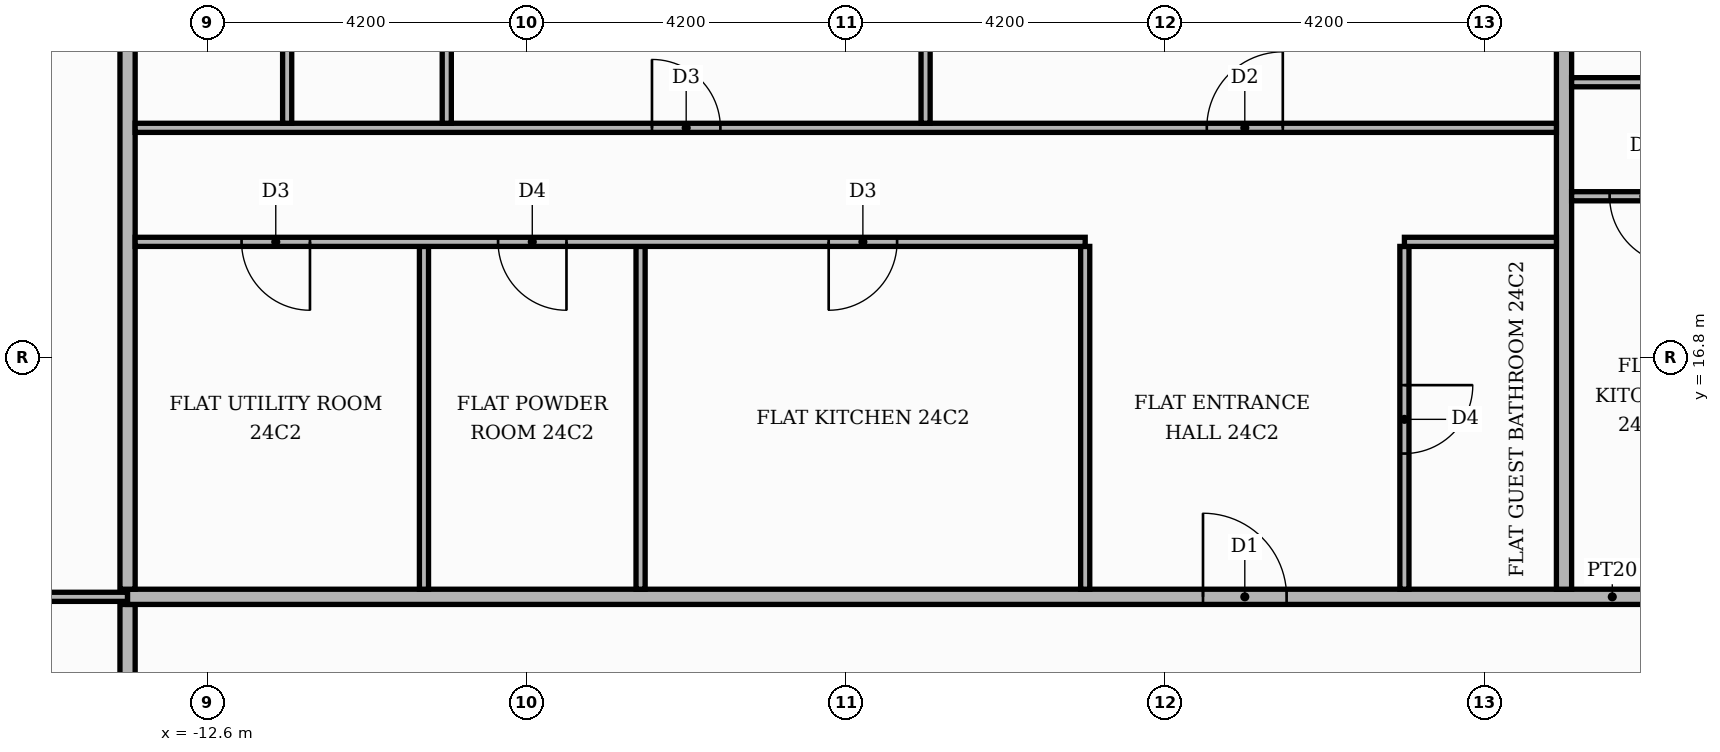
"""IFC4 building model, lengths in metres.
Left out: names, types, materials, properties, quantities, classifications, styles, units other than length and angle.
Written with IfcOpenShell. Run it as: python <this file> out.ifc"""

import sys

from ifc_helpers import new_model, si_unit, direction, frame, frame_2d, origin, place, context, subcontext, project, spatial, rectangle, extrude, element, fill, save


model = new_model("IFC4")
c1 = context("Model", 3, precision=1e-05, world=origin(), true_north=direction((0.0, 1.0)))
c2 = subcontext(c1, "Body", "Model", "MODEL_VIEW")
j1 = project(units=[si_unit("LENGTHUNIT", "METRE"), si_unit("PLANEANGLEUNIT", "RADIAN")], contexts=[c1])
p1 = place(None, origin())
s1 = spatial("IfcSite", under=j1, at=p1, CompositionType="ELEMENT")
p2 = place(p1, origin())
s2 = spatial("IfcBuilding", under=s1, at=p2, CompositionType="ELEMENT")
p3 = place(p2, frame((0.0, 0.0, 102.6)))
s3 = spatial("IfcBuildingStorey", under=s2, at=p3, CompositionType="ELEMENT", Elevation=102.6)
p4 = place(p3, frame((-13.65, -13.55, 0.0), z_axis=(0.0, 0.0, 1.0), x_axis=(0.0, 1.0, 0.0)))
e1 = element("IfcWall", 1, at=p4, inside=s3, PredefinedType="PARTITIONING", context=c2, shape_type="SweptSolid", body=[
    extrude(rectangle(XDim=27.1, YDim=0.2, at=frame_2d((13.55, 0.0))), origin(), (0.0, 0.0, 1.0), 3.48),
])
p5 = place(p4, frame((23.5, 0.0, 0.0)))
e2 = element("IfcOpeningElement", 2, at=p5, cuts=e1, PredefinedType="OPENING", context=c2, shape_type="SweptSolid", body=[
    extrude(rectangle(XDim=1.1, YDim=2.4, at=frame_2d((0.55, 1.2))), frame((0.0, 0.11, 0.0), z_axis=(0.0, -1.0, 0.0), x_axis=(1.0, 0.0, 0.0)), (0.0, 0.0, 1.0), 0.22),
])
p6 = place(p3, frame((-19.82, 13.65, 0.0), z_axis=(0.0, 0.0, 1.0), x_axis=(1.0, 0.0, 0.0)))
e3 = element("IfcWall", 3, at=p6, inside=s3, PredefinedType="PARTITIONING", context=c2, shape_type="SweptSolid", body=[
    extrude(rectangle(XDim=6.17, YDim=0.12, at=frame_2d((3.085, 0.0))), origin(), (0.0, 0.0, 1.0), 3.48),
])
p7 = place(p6, frame((2.635, 0.0, 0.0)))
e4 = element("IfcOpeningElement", 4, at=p7, cuts=e3, PredefinedType="OPENING", context=c2, shape_type="SweptSolid", body=[
    extrude(rectangle(XDim=0.9, YDim=2.1, at=frame_2d((0.45, 1.05))), frame((0.0, 0.07, 0.0), z_axis=(0.0, -1.0, 0.0), x_axis=(1.0, 0.0, 0.0)), (0.0, 0.0, 1.0), 0.14),
])
p8 = place(p3, frame((-13.65, 13.65, 0.0), z_axis=(0.0, 0.0, 1.0), x_axis=(1.0, 0.0, 0.0)))
e5 = element("IfcWall", 5, at=p8, inside=s3, PredefinedType="PARTITIONING", context=c2, shape_type="SweptSolid", body=[
    extrude(rectangle(XDim=39.07, YDim=0.2, at=frame_2d((19.535, 0.0))), origin(), (0.0, 0.0, 1.0), 3.48),
])
p9 = place(p8, frame((24.65, 0.0, 0.0)))
e6 = element("IfcOpeningElement", 6, at=p9, cuts=e5, PredefinedType="OPENING", context=c2, shape_type="SweptSolid", body=[
    extrude(rectangle(XDim=1.1, YDim=2.4, at=frame_2d((0.55, 1.2))), frame((0.0, 0.11, 0.0), z_axis=(0.0, -1.0, 0.0), x_axis=(1.0, 0.0, 0.0)), (0.0, 0.0, 1.0), 0.22),
])
p10 = place(p8, frame((14.15, 0.0, 0.0)))
e7 = element("IfcOpeningElement", 7, at=p10, cuts=e5, PredefinedType="OPENING", context=c2, shape_type="SweptSolid", body=[
    extrude(rectangle(XDim=1.1, YDim=2.4, at=frame_2d((0.55, 1.2))), frame((0.0, 0.11, 0.0), z_axis=(0.0, -1.0, 0.0), x_axis=(1.0, 0.0, 0.0)), (0.0, 0.0, 1.0), 0.22),
])
p11 = place(p3, frame((-13.65, 13.75, 0.0), z_axis=(0.0, 0.0, 1.0), x_axis=(0.0, 1.0, 0.0)))
e8 = element("IfcWall", 8, at=p11, inside=s3, PredefinedType="PARTITIONING", context=c2, shape_type="SweptSolid", body=[
    extrude(rectangle(XDim=11.67, YDim=0.2, at=frame_2d((5.835, 0.0))), origin(), (0.0, 0.0, 1.0), 3.48),
])
for number, where, z_axis, x_axis in (
    (9, (-9.75, 13.75, 0.0), (0.0, 0.0, 1.0), (0.0, 1.0, 0.0)),
    (10, (-6.9, 13.75, 0.0), (0.0, 0.0, 1.0), (0.0, 1.0, 0.0)),
    (11, (-1.05, 13.75, 0.0), (0.0, 0.0, 1.0), (0.0, 1.0, 0.0)),
):
    element("IfcWall", number, at=place(p3, frame(where, z_axis=z_axis, x_axis=x_axis)), inside=s3, PredefinedType="PARTITIONING", context=c2, shape_type="SweptSolid", body=[
        extrude(rectangle(XDim=4.51, YDim=0.12, at=frame_2d((2.255, 0.0))), origin(), (0.0, 0.0, 1.0), 3.48),
    ])
p12 = place(p3, frame((3.15, 13.75, 0.0), z_axis=(0.0, 0.0, 1.0), x_axis=(0.0, 1.0, 0.0)))
e12 = element("IfcWall", 12, at=p12, inside=s3, PredefinedType="PARTITIONING", context=c2, shape_type="SweptSolid", body=[
    extrude(rectangle(XDim=4.51, YDim=0.12, at=frame_2d((2.255, 0.0))), origin(), (0.0, 0.0, 1.0), 3.48),
])
p13 = place(p12, frame((1.785, 0.0, 0.0)))
e13 = element("IfcOpeningElement", 13, at=p13, cuts=e12, PredefinedType="OPENING", context=c2, shape_type="SweptSolid", body=[
    extrude(rectangle(XDim=0.9, YDim=2.1, at=frame_2d((0.45, 1.05))), frame((0.0, 0.07, 0.0), z_axis=(0.0, -1.0, 0.0), x_axis=(1.0, 0.0, 0.0)), (0.0, 0.0, 1.0), 0.14),
])
p14 = place(p3, frame((5.25, 13.75, 0.0), z_axis=(0.0, 0.0, 1.0), x_axis=(0.0, 1.0, 0.0)))
e14 = element("IfcWall", 14, at=p14, inside=s3, PredefinedType="PARTITIONING", context=c2, shape_type="SweptSolid", body=[
    extrude(rectangle(XDim=11.67, YDim=0.2, at=frame_2d((5.835, 0.0))), origin(), (0.0, 0.0, 1.0), 3.48),
])
p15 = place(p3, frame((-13.55, 18.32, 0.0), z_axis=(0.0, 0.0, 1.0), x_axis=(1.0, 0.0, 0.0)))
e15 = element("IfcWall", 15, at=p15, inside=s3, PredefinedType="PARTITIONING", context=c2, shape_type="SweptSolid", body=[
    extrude(rectangle(XDim=12.5, YDim=0.12, at=frame_2d((6.25, 0.0))), origin(), (0.0, 0.0, 1.0), 3.48),
])
p16 = place(p15, frame((9.125, 0.0, 0.0)))
e16 = element("IfcOpeningElement", 16, at=p16, cuts=e15, PredefinedType="OPENING", context=c2, shape_type="SweptSolid", body=[
    extrude(rectangle(XDim=0.9, YDim=2.1, at=frame_2d((0.45, 1.05))), frame((0.0, 0.07, 0.0), z_axis=(0.0, -1.0, 0.0), x_axis=(1.0, 0.0, 0.0)), (0.0, 0.0, 1.0), 0.14),
])
p17 = place(p15, frame((4.775, 0.0, 0.0)))
e17 = element("IfcOpeningElement", 17, at=p17, cuts=e15, PredefinedType="OPENING", context=c2, shape_type="SweptSolid", body=[
    extrude(rectangle(XDim=0.9, YDim=2.1, at=frame_2d((0.45, 1.05))), frame((0.0, 0.07, 0.0), z_axis=(0.0, -1.0, 0.0), x_axis=(1.0, 0.0, 0.0)), (0.0, 0.0, 1.0), 0.14),
])
p18 = place(p15, frame((1.4, 0.0, 0.0)))
e18 = element("IfcOpeningElement", 18, at=p18, cuts=e15, PredefinedType="OPENING", context=c2, shape_type="SweptSolid", body=[
    extrude(rectangle(XDim=0.9, YDim=2.1, at=frame_2d((0.45, 1.05))), frame((0.0, 0.07, 0.0), z_axis=(0.0, -1.0, 0.0), x_axis=(1.0, 0.0, 0.0)), (0.0, 0.0, 1.0), 0.14),
])
p19 = place(p3, frame((3.15, 18.32, 0.0), z_axis=(0.0, 0.0, 1.0), x_axis=(1.0, 0.0, 0.0)))
e19 = element("IfcWall", 19, at=p19, inside=s3, PredefinedType="PARTITIONING", context=c2, shape_type="SweptSolid", body=[
    extrude(rectangle(XDim=2.0, YDim=0.12, at=frame_2d((1.0, 0.0))), origin(), (0.0, 0.0, 1.0), 3.48),
])
p20 = place(p3, frame((5.35, 18.92, 0.0), z_axis=(0.0, 0.0, 1.0), x_axis=(1.0, 0.0, 0.0)))
e20 = element("IfcWall", 20, at=p20, inside=s3, PredefinedType="PARTITIONING", context=c2, shape_type="SweptSolid", body=[
    extrude(rectangle(XDim=4.1, YDim=0.12, at=frame_2d((2.05, 0.0))), origin(), (0.0, 0.0, 1.0), 3.48),
])
p21 = place(p20, frame((0.5, 0.0, 0.0)))
e21 = element("IfcOpeningElement", 21, at=p21, cuts=e20, PredefinedType="OPENING", context=c2, shape_type="SweptSolid", body=[
    extrude(rectangle(XDim=0.9, YDim=2.1, at=frame_2d((0.45, 1.05))), frame((0.0, 0.07, 0.0), z_axis=(0.0, -1.0, 0.0), x_axis=(1.0, 0.0, 0.0)), (0.0, 0.0, 1.0), 0.14),
])
p22 = place(p3, frame((-13.55, 19.82, 0.0), z_axis=(0.0, 0.0, 1.0), x_axis=(1.0, 0.0, 0.0)))
e22 = element("IfcWall", 22, at=p22, inside=s3, PredefinedType="PARTITIONING", context=c2, shape_type="SweptSolid", body=[
    extrude(rectangle(XDim=18.7, YDim=0.12, at=frame_2d((9.35, 0.0))), origin(), (0.0, 0.0, 1.0), 3.48),
])
p23 = place(p22, frame((14.1, 0.0, 0.0)))
e23 = element("IfcOpeningElement", 23, at=p23, cuts=e22, PredefinedType="OPENING", context=c2, shape_type="SweptSolid", body=[
    extrude(rectangle(XDim=1.0, YDim=2.1, at=frame_2d((0.5, 1.05))), frame((0.0, 0.07, 0.0), z_axis=(0.0, -1.0, 0.0), x_axis=(1.0, 0.0, 0.0)), (0.0, 0.0, 1.0), 0.14),
])
p24 = place(p22, frame((6.8, 0.0, 0.0)))
e24 = element("IfcOpeningElement", 24, at=p24, cuts=e22, PredefinedType="OPENING", context=c2, shape_type="SweptSolid", body=[
    extrude(rectangle(XDim=0.9, YDim=2.1, at=frame_2d((0.45, 1.05))), frame((0.0, 0.07, 0.0), z_axis=(0.0, -1.0, 0.0), x_axis=(1.0, 0.0, 0.0)), (0.0, 0.0, 1.0), 0.14),
])
p25 = place(p3, frame((-11.55, 19.88, 0.0), z_axis=(0.0, 0.0, 1.0), x_axis=(0.0, 1.0, 0.0)))
e25 = element("IfcWall", 25, at=p25, inside=s3, PredefinedType="PARTITIONING", context=c2, shape_type="SweptSolid", body=[
    extrude(rectangle(XDim=5.54, YDim=0.12, at=frame_2d((2.77, 0.0))), origin(), (0.0, 0.0, 1.0), 3.48),
])
p26 = place(p25, frame((2.44, 0.0, 0.0)))
e26 = element("IfcOpeningElement", 26, at=p26, cuts=e25, PredefinedType="OPENING", context=c2, shape_type="SweptSolid", body=[
    extrude(rectangle(XDim=0.9, YDim=2.1, at=frame_2d((0.45, 1.05))), frame((0.0, 0.07, 0.0), z_axis=(0.0, -1.0, 0.0), x_axis=(1.0, 0.0, 0.0)), (0.0, 0.0, 1.0), 0.14),
])
p27 = place(p3, frame((-9.45, 19.88, 0.0), z_axis=(0.0, 0.0, 1.0), x_axis=(0.0, 1.0, 0.0)))
e27 = element("IfcWall", 27, at=p27, inside=s3, PredefinedType="PARTITIONING", context=c2, shape_type="SweptSolid", body=[
    extrude(rectangle(XDim=5.54, YDim=0.12, at=frame_2d((2.77, 0.0))), origin(), (0.0, 0.0, 1.0), 3.48),
])
p28 = place(p27, frame((2.44, 0.0, 0.0)))
e28 = element("IfcOpeningElement", 28, at=p28, cuts=e27, PredefinedType="OPENING", context=c2, shape_type="SweptSolid", body=[
    extrude(rectangle(XDim=0.9, YDim=2.1, at=frame_2d((0.45, 1.05))), frame((0.0, 0.07, 0.0), z_axis=(0.0, -1.0, 0.0), x_axis=(1.0, 0.0, 0.0)), (0.0, 0.0, 1.0), 0.14),
])
p29 = place(p3, frame((-3.15, 19.88, 0.0), z_axis=(0.0, 0.0, 1.0), x_axis=(0.0, 1.0, 0.0)))
e29 = element("IfcWall", 29, at=p29, inside=s3, PredefinedType="PARTITIONING", context=c2, shape_type="SweptSolid", body=[
    extrude(rectangle(XDim=5.54, YDim=0.12, at=frame_2d((2.77, 0.0))), origin(), (0.0, 0.0, 1.0), 3.48),
])
p30 = place(p3, frame((5.35, 20.42, 0.0), z_axis=(0.0, 0.0, 1.0), x_axis=(1.0, 0.0, 0.0)))
e30 = element("IfcWall", 30, at=p30, inside=s3, PredefinedType="PARTITIONING", context=c2, shape_type="SweptSolid", body=[
    extrude(rectangle(XDim=20.07, YDim=0.12, at=frame_2d((10.035, 0.0))), origin(), (0.0, 0.0, 1.0), 3.48),
])
p31 = place(p30, frame((8.85, 0.0, 0.0)))
e31 = element("IfcOpeningElement", 31, at=p31, cuts=e30, PredefinedType="OPENING", context=c2, shape_type="SweptSolid", body=[
    extrude(rectangle(XDim=1.0, YDim=2.1, at=frame_2d((0.5, 1.05))), frame((0.0, 0.07, 0.0), z_axis=(0.0, -1.0, 0.0), x_axis=(1.0, 0.0, 0.0)), (0.0, 0.0, 1.0), 0.14),
])
p32 = place(p30, frame((5.75, 0.0, 0.0)))
e32 = element("IfcOpeningElement", 32, at=p32, cuts=e30, PredefinedType="OPENING", context=c2, shape_type="SweptSolid", body=[
    extrude(rectangle(XDim=0.9, YDim=2.1, at=frame_2d((0.45, 1.05))), frame((0.0, 0.07, 0.0), z_axis=(0.0, -1.0, 0.0), x_axis=(1.0, 0.0, 0.0)), (0.0, 0.0, 1.0), 0.14),
])
p33 = place(p21, frame((0.9, 0.0, 0.0), z_axis=(0.0, 0.0, 1.0), x_axis=(-1.0, 0.0, 0.0)))
e33 = element("IfcDoor", 33, at=p33, inside=s3, OperationType="SINGLE_SWING_RIGHT", PredefinedType="DOOR", context=c2, shape_type="SweptSolid", body=[
    extrude(rectangle(XDim=0.9, YDim=2.1, at=frame_2d((0.45, 1.05))), frame((0.0, 0.025, 0.0), z_axis=(0.0, -1.0, 0.0), x_axis=(1.0, 0.0, 0.0)), (0.0, 0.0, 1.0), 0.05),
])
fill(e21, e33)
p34 = place(p10, origin())
e34 = element("IfcDoor", 34, at=p34, inside=s3, OperationType="SINGLE_SWING_LEFT", PredefinedType="DOOR", context=c2, shape_type="SweptSolid", body=[
    extrude(rectangle(XDim=1.1, YDim=2.4, at=frame_2d((0.55, 1.2))), frame((0.0, 0.025, 0.0), z_axis=(0.0, -1.0, 0.0), x_axis=(1.0, 0.0, 0.0)), (0.0, 0.0, 1.0), 0.05),
])
fill(e7, e34)
p35 = place(p13, frame((0.9, 0.0, 0.0), z_axis=(0.0, 0.0, 1.0), x_axis=(-1.0, 0.0, 0.0)))
e35 = element("IfcDoor", 35, at=p35, inside=s3, OperationType="SINGLE_SWING_RIGHT", PredefinedType="DOOR", context=c2, shape_type="SweptSolid", body=[
    extrude(rectangle(XDim=0.9, YDim=2.1, at=frame_2d((0.45, 1.05))), frame((0.0, 0.025, 0.0), z_axis=(0.0, -1.0, 0.0), x_axis=(1.0, 0.0, 0.0)), (0.0, 0.0, 1.0), 0.05),
])
fill(e13, e35)
p36 = place(p16, frame((0.9, 0.0, 0.0), z_axis=(0.0, 0.0, 1.0), x_axis=(-1.0, 0.0, 0.0)))
e36 = element("IfcDoor", 36, at=p36, inside=s3, OperationType="SINGLE_SWING_LEFT", PredefinedType="DOOR", context=c2, shape_type="SweptSolid", body=[
    extrude(rectangle(XDim=0.9, YDim=2.1, at=frame_2d((0.45, 1.05))), frame((0.0, 0.025, 0.0), z_axis=(0.0, -1.0, 0.0), x_axis=(1.0, 0.0, 0.0)), (0.0, 0.0, 1.0), 0.05),
])
fill(e16, e36)
p37 = place(p17, frame((0.9, 0.0, 0.0), z_axis=(0.0, 0.0, 1.0), x_axis=(-1.0, 0.0, 0.0)))
e37 = element("IfcDoor", 37, at=p37, inside=s3, OperationType="SINGLE_SWING_RIGHT", PredefinedType="DOOR", context=c2, shape_type="SweptSolid", body=[
    extrude(rectangle(XDim=0.9, YDim=2.1, at=frame_2d((0.45, 1.05))), frame((0.0, 0.025, 0.0), z_axis=(0.0, -1.0, 0.0), x_axis=(1.0, 0.0, 0.0)), (0.0, 0.0, 1.0), 0.05),
])
fill(e17, e37)
p38 = place(p18, frame((0.9, 0.0, 0.0), z_axis=(0.0, 0.0, 1.0), x_axis=(-1.0, 0.0, 0.0)))
e38 = element("IfcDoor", 38, at=p38, inside=s3, OperationType="SINGLE_SWING_RIGHT", PredefinedType="DOOR", context=c2, shape_type="SweptSolid", body=[
    extrude(rectangle(XDim=0.9, YDim=2.1, at=frame_2d((0.45, 1.05))), frame((0.0, 0.025, 0.0), z_axis=(0.0, -1.0, 0.0), x_axis=(1.0, 0.0, 0.0)), (0.0, 0.0, 1.0), 0.05),
])
fill(e18, e38)
p39 = place(p23, origin())
e39 = element("IfcDoor", 39, at=p39, inside=s3, OperationType="SINGLE_SWING_RIGHT", PredefinedType="DOOR", context=c2, shape_type="SweptSolid", body=[
    extrude(rectangle(XDim=1.0, YDim=2.1, at=frame_2d((0.5, 1.05))), frame((0.0, 0.025, 0.0), z_axis=(0.0, -1.0, 0.0), x_axis=(1.0, 0.0, 0.0)), (0.0, 0.0, 1.0), 0.05),
])
fill(e23, e39)
p40 = place(p24, origin())
e40 = element("IfcDoor", 40, at=p40, inside=s3, OperationType="SINGLE_SWING_LEFT", PredefinedType="DOOR", context=c2, shape_type="SweptSolid", body=[
    extrude(rectangle(XDim=0.9, YDim=2.1, at=frame_2d((0.45, 1.05))), frame((0.0, 0.025, 0.0), z_axis=(0.0, -1.0, 0.0), x_axis=(1.0, 0.0, 0.0)), (0.0, 0.0, 1.0), 0.05),
])
fill(e24, e40)
save(model, sys.argv[1])
